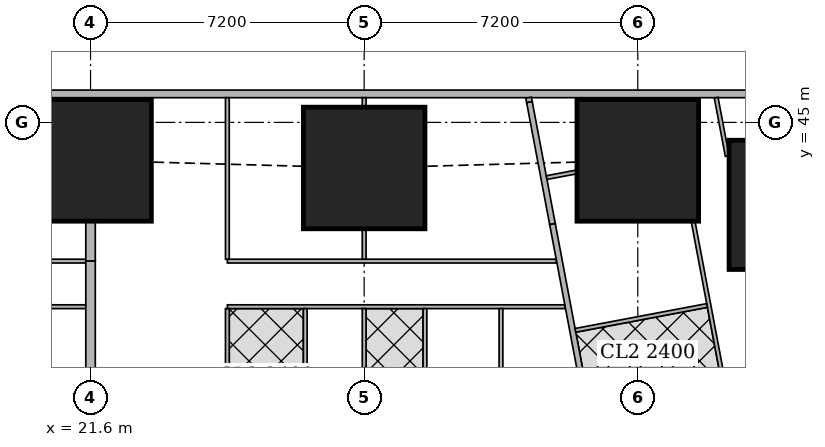
"""IFC4 building model, lengths in metres.
Left out: names, types, materials, properties, quantities, classifications, styles, units other than length and angle.
Written with IfcOpenShell. Run it as: python <this file> out.ifc"""

import sys

from ifc_helpers import new_model, si_unit, direction, frame, frame_2d, origin, origin_2d, place, context, subcontext, project, spatial, rectangle, extrude, element, fill, save


model = new_model("IFC4")
c1 = context("Model", 3, precision=1e-05, world=origin(), true_north=direction((0.0, 1.0)))
c2 = subcontext(c1, "Body", "Model", "MODEL_VIEW")
j1 = project(units=[si_unit("LENGTHUNIT", "METRE"), si_unit("PLANEANGLEUNIT", "RADIAN")], contexts=[c1])
p1 = place(None, origin())
s1 = spatial("IfcSite", under=j1, at=p1, CompositionType="ELEMENT")
p2 = place(p1, origin())
s2 = spatial("IfcBuilding", under=s1, at=p2, CompositionType="ELEMENT")
p3 = place(p2, frame((0.0, 0.0, 20.0)))
s3 = spatial("IfcBuildingStorey", under=s2, at=p3, CompositionType="ELEMENT", Elevation=20.0)
p4 = place(p3, frame((40.102, 42.83, 0.0), z_axis=(0.0, 0.0, 1.0), x_axis=(1.0, 0.0, 0.0)))
e1 = element("IfcColumn", 1, at=p4, inside=s3, PredefinedType="COLUMN", context=c2, shape_type="SweptSolid", body=[
    extrude(rectangle(XDim=3.4, YDim=3.4, at=origin_2d()), origin(), (0.0, 0.0, 1.0), 3.75),
])
p5 = place(p3, frame((21.6, 44.0, -0.3), z_axis=(0.0, 0.0, 1.0), x_axis=(1.0, 0.0, 0.0)))
e2 = element("IfcColumn", 2, at=p5, inside=s3, PredefinedType="COLUMN", context=c2, shape_type="SweptSolid", body=[
    extrude(rectangle(XDim=3.2, YDim=3.2, at=origin_2d()), origin(), (0.0, 0.0, 1.0), 4.05),
])
p6 = place(p3, frame((28.8, 43.8, 0.0), z_axis=(0.0, 0.0, 1.0), x_axis=(1.0, 0.0, 0.0)))
e3 = element("IfcColumn", 3, at=p6, inside=s3, PredefinedType="COLUMN", context=c2, shape_type="SweptSolid", body=[
    extrude(rectangle(XDim=3.2, YDim=3.2, at=origin_2d()), origin(), (0.0, 0.0, 1.0), 3.75),
])
p7 = place(p3, frame((36.0, 44.0, -0.3), z_axis=(0.0, 0.0, 1.0), x_axis=(1.0, 0.0, 0.0)))
e4 = element("IfcColumn", 4, at=p7, inside=s3, PredefinedType="COLUMN", context=c2, shape_type="SweptSolid", body=[
    extrude(rectangle(XDim=3.2, YDim=3.2, at=origin_2d()), origin(), (0.0, 0.0, 1.0), 4.05),
])
p8 = place(p3, frame((40.106, 45.75, 0.0), z_axis=(0.0, 0.0, 1.0), x_axis=(-1.0, 0.0, 0.0)))
e5 = element("IfcWall", 5, at=p8, inside=s3, PredefinedType="SOLIDWALL", context=c2, shape_type="SweptSolid", body=[
    extrude(rectangle(XDim=37.943, YDim=0.2, at=frame_2d((18.971, 0.0))), origin(), (0.0, 0.0, 1.0), 3.5),
])
p9 = place(p8, frame((8.606, 0.0, 0.9)))
e6 = element("IfcOpeningElement", 6, at=p9, cuts=e5, PredefinedType="OPENING", context=c2, shape_type="SweptSolid", body=[
    extrude(rectangle(XDim=1.8, YDim=1.5, at=frame_2d((0.9, 0.75))), frame((0.0, 0.11, 0.0), z_axis=(0.0, -1.0, 0.0), x_axis=(1.0, 0.0, 0.0)), (0.0, 0.0, 1.0), 0.22),
])
p10 = place(p8, frame((12.206, 0.0, 0.9)))
e7 = element("IfcOpeningElement", 7, at=p10, cuts=e5, PredefinedType="OPENING", context=c2, shape_type="SweptSolid", body=[
    extrude(rectangle(XDim=1.8, YDim=1.5, at=frame_2d((0.9, 0.75))), frame((0.0, 0.11, 0.0), z_axis=(0.0, -1.0, 0.0), x_axis=(1.0, 0.0, 0.0)), (0.0, 0.0, 1.0), 0.22),
])
p11 = place(p8, frame((15.806, 0.0, 0.9)))
e8 = element("IfcOpeningElement", 8, at=p11, cuts=e5, PredefinedType="OPENING", context=c2, shape_type="SweptSolid", body=[
    extrude(rectangle(XDim=1.8, YDim=1.5, at=frame_2d((0.9, 0.75))), frame((0.0, 0.11, 0.0), z_axis=(0.0, -1.0, 0.0), x_axis=(1.0, 0.0, 0.0)), (0.0, 0.0, 1.0), 0.22),
])
p12 = place(p8, frame((19.406, 0.0, 0.9)))
e9 = element("IfcOpeningElement", 9, at=p12, cuts=e5, PredefinedType="OPENING", context=c2, shape_type="SweptSolid", body=[
    extrude(rectangle(XDim=1.8, YDim=1.5, at=frame_2d((0.9, 0.75))), frame((0.0, 0.11, 0.0), z_axis=(0.0, -1.0, 0.0), x_axis=(1.0, 0.0, 0.0)), (0.0, 0.0, 1.0), 0.22),
])
p13 = place(p8, frame((23.006, 0.0, 0.9)))
e10 = element("IfcOpeningElement", 10, at=p13, cuts=e5, PredefinedType="OPENING", context=c2, shape_type="SweptSolid", body=[
    extrude(rectangle(XDim=1.8, YDim=1.5, at=frame_2d((0.9, 0.75))), frame((0.0, 0.11, 0.0), z_axis=(0.0, -1.0, 0.0), x_axis=(1.0, 0.0, 0.0)), (0.0, 0.0, 1.0), 0.22),
])
p14 = place(p8, frame((26.606, 0.0, 0.9)))
e11 = element("IfcOpeningElement", 11, at=p14, cuts=e5, PredefinedType="OPENING", context=c2, shape_type="SweptSolid", body=[
    extrude(rectangle(XDim=1.8, YDim=1.5, at=frame_2d((0.9, 0.75))), frame((0.0, 0.11, 0.0), z_axis=(0.0, -1.0, 0.0), x_axis=(1.0, 0.0, 0.0)), (0.0, 0.0, 1.0), 0.22),
])
p15 = place(p3, frame((33.127, 45.65, 0.0), z_axis=(0.0, 0.0, 1.0), x_axis=(0.184660164975, -0.98280243359, 0.0)))
e12 = element("IfcWall", 12, at=p15, inside=s3, PredefinedType="SOLIDWALL", context=c2, shape_type="SweptSolid", body=[
    extrude(rectangle(XDim=0.119, YDim=0.15, at=frame_2d((0.06, 0.0))), origin(), (0.0, 0.0, 1.0), 3.5),
])
p16 = place(p3, frame((33.149, 45.533, 0.0), z_axis=(0.0, 0.0, 1.0), x_axis=(0.185606774758, -0.98262410166, 0.0)))
e13 = element("IfcWall", 13, at=p16, inside=s3, PredefinedType="SOLIDWALL", context=c2, shape_type="SweptSolid", body=[
    extrude(rectangle(XDim=3.265, YDim=0.15, at=frame_2d((1.632, 0.0))), origin(), (0.0, 0.0, 1.0), 2.05),
])
p17 = place(p3, frame((33.755, 42.325, 0.0), z_axis=(0.0, 0.0, 1.0), x_axis=(0.185611461091, -0.982623216453, 0.0)))
e14 = element("IfcWall", 14, at=p17, inside=s3, PredefinedType="SOLIDWALL", context=c2, shape_type="SweptSolid", body=[
    extrude(rectangle(XDim=40.241, YDim=0.15, at=frame_2d((20.121, 0.0))), origin(), (0.0, 0.0, 1.0), 2.5),
])
p18 = place(p17, frame((7.325, 0.0, 0.0)))
e15 = element("IfcOpeningElement", 15, at=p18, cuts=e14, PredefinedType="OPENING", context=c2, shape_type="SweptSolid", body=[
    extrude(rectangle(XDim=1.0, YDim=2.1, at=frame_2d((0.5, 1.05))), frame((0.0, 0.085, 0.0), z_axis=(0.0, -1.0, 0.0), x_axis=(1.0, 0.0, 0.0)), (0.0, 0.0, 1.0), 0.17),
])
p19 = place(p17, frame((11.902, 0.0, 0.0)))
e16 = element("IfcOpeningElement", 16, at=p19, cuts=e14, PredefinedType="OPENING", context=c2, shape_type="SweptSolid", body=[
    extrude(rectangle(XDim=1.0, YDim=2.1, at=frame_2d((0.5, 1.05))), frame((0.0, 0.085, 0.0), z_axis=(0.0, -1.0, 0.0), x_axis=(1.0, 0.0, 0.0)), (0.0, 0.0, 1.0), 0.17),
])
p20 = place(p17, frame((25.718, 0.0, 0.0)))
e17 = element("IfcOpeningElement", 17, at=p20, cuts=e14, PredefinedType="OPENING", context=c2, shape_type="SweptSolid", body=[
    extrude(rectangle(XDim=1.0, YDim=2.1, at=frame_2d((0.5, 1.05))), frame((0.0, 0.085, 0.0), z_axis=(0.0, -1.0, 0.0), x_axis=(1.0, 0.0, 0.0)), (0.0, 0.0, 1.0), 0.17),
])
p21 = place(p17, frame((31.788, 0.0, 0.0)))
e18 = element("IfcOpeningElement", 18, at=p21, cuts=e14, PredefinedType="OPENING", context=c2, shape_type="SweptSolid", body=[
    extrude(rectangle(XDim=1.0, YDim=2.1, at=frame_2d((0.5, 1.05))), frame((0.0, 0.085, 0.0), z_axis=(0.0, -1.0, 0.0), x_axis=(1.0, 0.0, 0.0)), (0.0, 0.0, 1.0), 0.17),
])
p22 = place(p3, frame((38.063, 45.65, 0.0), z_axis=(0.0, 0.0, 1.0), x_axis=(0.185789650565, -0.982589540827, 0.0)))
e19 = element("IfcWall", 19, at=p22, inside=s3, PredefinedType="PARTITIONING", context=c2, shape_type="SweptSolid", body=[
    extrude(rectangle(XDim=1.561, YDim=0.1, at=frame_2d((0.781, 0.0))), origin(), (0.0, 0.0, 1.0), 3.5),
])
p23 = place(p3, frame((37.457, 42.39, 0.0), z_axis=(0.0, 0.0, 1.0), x_axis=(0.185560627322, -0.982632817276, 0.0)))
e20 = element("IfcWall", 20, at=p23, inside=s3, PredefinedType="PARTITIONING", context=c2, shape_type="SweptSolid", body=[
    extrude(rectangle(XDim=4.484, YDim=0.1, at=frame_2d((2.242, 0.0))), origin(), (0.0, 0.0, 1.0), 3.5),
])
p24 = place(p23, frame((2.936, 0.0, 0.0)))
e21 = element("IfcOpeningElement", 21, at=p24, cuts=e20, PredefinedType="OPENING", context=c2, shape_type="SweptSolid", body=[
    extrude(rectangle(XDim=0.9, YDim=2.1, at=frame_2d((0.45, 1.05))), frame((0.0, 0.06, 0.0), z_axis=(0.0, -1.0, 0.0), x_axis=(1.0, 0.0, 0.0)), (0.0, 0.0, 1.0), 0.12),
])
p25 = place(p3, frame((34.39, 43.696, 0.0), z_axis=(0.0, 0.0, 1.0), x_axis=(-0.982640737979, -0.185518678479, 0.0)))
e22 = element("IfcWall", 22, at=p25, inside=s3, PredefinedType="PARTITIONING", context=c2, shape_type="SweptSolid", body=[
    extrude(rectangle(XDim=0.803, YDim=0.1, at=frame_2d((0.401, 0.0))), origin(), (0.0, 0.0, 1.0), 2.05),
])
p26 = place(p3, frame((37.823, 40.182, 0.0), z_axis=(0.0, 0.0, 1.0), x_axis=(-0.98263926043, -0.185526504472, 0.0)))
e23 = element("IfcWall", 23, at=p26, inside=s3, PredefinedType="PARTITIONING", context=c2, shape_type="SweptSolid", body=[
    extrude(rectangle(XDim=3.524, YDim=0.1, at=frame_2d((1.762, 0.0))), origin(), (0.0, 0.0, 1.0), 3.5),
])
p27 = place(p3, frame((18.0, 41.35, 0.0), z_axis=(0.0, 0.0, 1.0), x_axis=(1.0, 0.0, 0.0)))
e24 = element("IfcWall", 24, at=p27, inside=s3, PredefinedType="PARTITIONING", context=c2, shape_type="SweptSolid", body=[
    extrude(rectangle(XDim=3.475, YDim=0.1, at=frame_2d((1.738, 0.0))), origin(), (0.0, 0.0, 1.0), 3.5),
])
p28 = place(p27, frame((0.2, 0.0, 0.0)))
e25 = element("IfcOpeningElement", 25, at=p28, cuts=e24, PredefinedType="OPENING", context=c2, shape_type="SweptSolid", body=[
    extrude(rectangle(XDim=0.9, YDim=2.1, at=frame_2d((0.45, 1.05))), frame((0.0, 0.06, 0.0), z_axis=(0.0, -1.0, 0.0), x_axis=(1.0, 0.0, 0.0)), (0.0, 0.0, 1.0), 0.12),
])
p29 = place(p3, frame((18.0, 40.15, 0.0), z_axis=(0.0, 0.0, 1.0), x_axis=(1.0, 0.0, 0.0)))
e26 = element("IfcWall", 26, at=p29, inside=s3, PredefinedType="PARTITIONING", context=c2, shape_type="SweptSolid", body=[
    extrude(rectangle(XDim=3.475, YDim=0.1, at=frame_2d((1.738, 0.0))), origin(), (0.0, 0.0, 1.0), 3.5),
])
p30 = place(p29, frame((0.575, 0.0, 0.0)))
e27 = element("IfcOpeningElement", 27, at=p30, cuts=e26, PredefinedType="OPENING", context=c2, shape_type="SweptSolid", body=[
    extrude(rectangle(XDim=0.9, YDim=2.1, at=frame_2d((0.45, 1.05))), frame((0.0, 0.06, 0.0), z_axis=(0.0, -1.0, 0.0), x_axis=(1.0, 0.0, 0.0)), (0.0, 0.0, 1.0), 0.12),
])
p31 = place(p29, frame((2.375, 0.0, 0.0)))
e28 = element("IfcOpeningElement", 28, at=p31, cuts=e26, PredefinedType="OPENING", context=c2, shape_type="SweptSolid", body=[
    extrude(rectangle(XDim=0.9, YDim=2.1, at=frame_2d((0.45, 1.05))), frame((0.0, 0.06, 0.0), z_axis=(0.0, -1.0, 0.0), x_axis=(1.0, 0.0, 0.0)), (0.0, 0.0, 1.0), 0.12),
])
p32 = place(p3, frame((25.2, 41.35, 0.0), z_axis=(0.0, 0.0, 1.0), x_axis=(1.0, 0.0, 0.0)))
e29 = element("IfcWall", 29, at=p32, inside=s3, PredefinedType="PARTITIONING", context=c2, shape_type="SweptSolid", body=[
    extrude(rectangle(XDim=8.653, YDim=0.1, at=frame_2d((4.327, 0.0))), origin(), (0.0, 0.0, 1.0), 3.5),
])
p33 = place(p32, frame((0.2, 0.0, 0.0)))
e30 = element("IfcOpeningElement", 30, at=p33, cuts=e29, PredefinedType="OPENING", context=c2, shape_type="SweptSolid", body=[
    extrude(rectangle(XDim=0.9, YDim=2.1, at=frame_2d((0.45, 1.05))), frame((0.0, 0.06, 0.0), z_axis=(0.0, -1.0, 0.0), x_axis=(1.0, 0.0, 0.0)), (0.0, 0.0, 1.0), 0.12),
])
p34 = place(p32, frame((5.25, 0.0, 0.0)))
e31 = element("IfcOpeningElement", 31, at=p34, cuts=e29, PredefinedType="OPENING", context=c2, shape_type="SweptSolid", body=[
    extrude(rectangle(XDim=0.9, YDim=2.1, at=frame_2d((0.45, 1.05))), frame((0.0, 0.06, 0.0), z_axis=(0.0, -1.0, 0.0), x_axis=(1.0, 0.0, 0.0)), (0.0, 0.0, 1.0), 0.12),
])
p35 = place(p3, frame((25.2, 40.15, 0.0), z_axis=(0.0, 0.0, 1.0), x_axis=(1.0, 0.0, 0.0)))
e32 = element("IfcWall", 32, at=p35, inside=s3, PredefinedType="PARTITIONING", context=c2, shape_type="SweptSolid", body=[
    extrude(rectangle(XDim=8.88, YDim=0.1, at=frame_2d((4.44, 0.0))), origin(), (0.0, 0.0, 1.0), 3.5),
])
p36 = place(p35, frame((0.575, 0.0, 0.0)))
e33 = element("IfcOpeningElement", 33, at=p36, cuts=e32, PredefinedType="OPENING", context=c2, shape_type="SweptSolid", body=[
    extrude(rectangle(XDim=0.9, YDim=2.1, at=frame_2d((0.45, 1.05))), frame((0.0, 0.06, 0.0), z_axis=(0.0, -1.0, 0.0), x_axis=(1.0, 0.0, 0.0)), (0.0, 0.0, 1.0), 0.12),
])
p37 = place(p35, frame((3.95, 0.0, 0.0)))
e34 = element("IfcOpeningElement", 34, at=p37, cuts=e32, PredefinedType="OPENING", context=c2, shape_type="SweptSolid", body=[
    extrude(rectangle(XDim=0.9, YDim=2.1, at=frame_2d((0.45, 1.05))), frame((0.0, 0.06, 0.0), z_axis=(0.0, -1.0, 0.0), x_axis=(1.0, 0.0, 0.0)), (0.0, 0.0, 1.0), 0.12),
])
p38 = place(p35, frame((7.83, 0.0, 0.0)))
e35 = element("IfcOpeningElement", 35, at=p38, cuts=e32, PredefinedType="OPENING", context=c2, shape_type="SweptSolid", body=[
    extrude(rectangle(XDim=0.9, YDim=2.1, at=frame_2d((0.45, 1.05))), frame((0.0, 0.06, 0.0), z_axis=(0.0, -1.0, 0.0), x_axis=(1.0, 0.0, 0.0)), (0.0, 0.0, 1.0), 0.12),
])
p39 = place(p35, frame((2.375, 0.0, 0.0)))
e36 = element("IfcOpeningElement", 36, at=p39, cuts=e32, PredefinedType="OPENING", context=c2, shape_type="SweptSolid", body=[
    extrude(rectangle(XDim=0.9, YDim=2.1, at=frame_2d((0.45, 1.05))), frame((0.0, 0.06, 0.0), z_axis=(0.0, -1.0, 0.0), x_axis=(1.0, 0.0, 0.0)), (0.0, 0.0, 1.0), 0.12),
])
p40 = place(p35, frame((5.75, 0.0, 0.0)))
e37 = element("IfcOpeningElement", 37, at=p40, cuts=e32, PredefinedType="OPENING", context=c2, shape_type="SweptSolid", body=[
    extrude(rectangle(XDim=0.9, YDim=2.1, at=frame_2d((0.45, 1.05))), frame((0.0, 0.06, 0.0), z_axis=(0.0, -1.0, 0.0), x_axis=(1.0, 0.0, 0.0)), (0.0, 0.0, 1.0), 0.12),
])
p41 = place(p3, frame((25.2, 41.4, 0.0), z_axis=(0.0, 0.0, 1.0), x_axis=(0.0, 1.0, 0.0)))
e38 = element("IfcWall", 38, at=p41, inside=s3, PredefinedType="PARTITIONING", context=c2, shape_type="SweptSolid", body=[
    extrude(rectangle(XDim=4.25, YDim=0.1, at=frame_2d((2.125, 0.0))), origin(), (0.0, 0.0, 1.0), 2.05),
])
p42 = place(p3, frame((28.8, 41.4, 0.0), z_axis=(0.0, 0.0, 1.0), x_axis=(0.0, 1.0, 0.0)))
e39 = element("IfcWall", 39, at=p42, inside=s3, PredefinedType="PARTITIONING", context=c2, shape_type="SweptSolid", body=[
    extrude(rectangle(XDim=0.799, YDim=0.1, at=frame_2d((0.399, 0.0))), origin(), (0.0, 0.0, 1.0), 3.5),
])
p43 = place(p3, frame((28.8, 45.401, 0.0), z_axis=(0.0, 0.0, 1.0), x_axis=(0.0, 1.0, 0.0)))
e40 = element("IfcWall", 40, at=p43, inside=s3, PredefinedType="PARTITIONING", context=c2, shape_type="SweptSolid", body=[
    extrude(rectangle(XDim=0.249, YDim=0.1, at=frame_2d((0.125, 0.0))), origin(), (0.0, 0.0, 1.0), 3.5),
])
p44 = place(p3, frame((25.2, 36.575, 0.0), z_axis=(0.0, 0.0, 1.0), x_axis=(0.0, 1.0, 0.0)))
e41 = element("IfcWall", 41, at=p44, inside=s3, PredefinedType="PARTITIONING", context=c2, shape_type="SweptSolid", body=[
    extrude(rectangle(XDim=3.525, YDim=0.1, at=frame_2d((1.763, 0.0))), origin(), (0.0, 0.0, 1.0), 3.5),
])
p45 = place(p3, frame((28.8, 38.401, 0.0), z_axis=(0.0, 0.0, 1.0), x_axis=(0.0, 1.0, 0.0)))
e42 = element("IfcWall", 42, at=p45, inside=s3, PredefinedType="PARTITIONING", context=c2, shape_type="SweptSolid", body=[
    extrude(rectangle(XDim=1.699, YDim=0.1, at=frame_2d((0.85, 0.0))), origin(), (0.0, 0.0, 1.0), 3.5),
])
for number, where, z_axis, x_axis in (
    (43, (32.4, 36.575, 0.0), (0.0, 0.0, 1.0), (0.0, 1.0, 0.0)),
    (44, (27.25, 36.575, 0.0), (0.0, 0.0, 1.0), (0.0, 1.0, 0.0)),
    (45, (30.4, 36.575, 0.0), (0.0, 0.0, 1.0), (0.0, 1.0, 0.0)),
):
    element("IfcWall", number, at=place(p3, frame(where, z_axis=z_axis, x_axis=x_axis)), inside=s3, PredefinedType="PARTITIONING", context=c2, shape_type="SweptSolid", body=[
        extrude(rectangle(XDim=3.525, YDim=0.1, at=frame_2d((1.763, 0.0))), origin(), (0.0, 0.0, 1.0), 3.5),
    ])
p46 = place(p3, frame((21.6, 41.35, 0.0), z_axis=(0.0, 0.0, 1.0), x_axis=(0.0, 1.0, 0.0)))
e46 = element("IfcWall", 46, at=p46, inside=s3, PredefinedType="SOLIDWALL", context=c2, shape_type="SweptSolid", body=[
    extrude(rectangle(XDim=1.049, YDim=0.25, at=frame_2d((0.524, 0.0))), origin(), (0.0, 0.0, 1.0), 2.05),
])
p47 = place(p3, frame((21.6, 38.401, 0.0), z_axis=(0.0, 0.0, 1.0), x_axis=(0.0, 1.0, 0.0)))
e47 = element("IfcWall", 47, at=p47, inside=s3, PredefinedType="SOLIDWALL", context=c2, shape_type="SweptSolid", body=[
    extrude(rectangle(XDim=2.949, YDim=0.25, at=frame_2d((1.475, 0.0))), origin(), (0.0, 0.0, 1.0), 3.5),
])
p48 = place(p9, origin())
e48 = element("IfcWindow", 48, at=p48, inside=s3, PartitioningType="SINGLE_PANEL", PredefinedType="WINDOW", context=c2, shape_type="SweptSolid", body=[
    extrude(rectangle(XDim=1.8, YDim=1.5, at=frame_2d((0.9, 0.75))), frame((0.0, 0.03, 0.0), z_axis=(0.0, -1.0, 0.0), x_axis=(1.0, 0.0, 0.0)), (0.0, 0.0, 1.0), 0.06),
])
fill(e6, e48)
p49 = place(p10, origin())
e49 = element("IfcWindow", 49, at=p49, inside=s3, PartitioningType="SINGLE_PANEL", PredefinedType="WINDOW", context=c2, shape_type="SweptSolid", body=[
    extrude(rectangle(XDim=1.8, YDim=1.5, at=frame_2d((0.9, 0.75))), frame((0.0, 0.03, 0.0), z_axis=(0.0, -1.0, 0.0), x_axis=(1.0, 0.0, 0.0)), (0.0, 0.0, 1.0), 0.06),
])
fill(e7, e49)
p50 = place(p11, origin())
e50 = element("IfcWindow", 50, at=p50, inside=s3, PartitioningType="SINGLE_PANEL", PredefinedType="WINDOW", context=c2, shape_type="SweptSolid", body=[
    extrude(rectangle(XDim=1.8, YDim=1.5, at=frame_2d((0.9, 0.75))), frame((0.0, 0.03, 0.0), z_axis=(0.0, -1.0, 0.0), x_axis=(1.0, 0.0, 0.0)), (0.0, 0.0, 1.0), 0.06),
])
fill(e8, e50)
p51 = place(p12, origin())
e51 = element("IfcWindow", 51, at=p51, inside=s3, PartitioningType="SINGLE_PANEL", PredefinedType="WINDOW", context=c2, shape_type="SweptSolid", body=[
    extrude(rectangle(XDim=1.8, YDim=1.5, at=frame_2d((0.9, 0.75))), frame((0.0, 0.03, 0.0), z_axis=(0.0, -1.0, 0.0), x_axis=(1.0, 0.0, 0.0)), (0.0, 0.0, 1.0), 0.06),
])
fill(e9, e51)
p52 = place(p24, origin())
e52 = element("IfcDoor", 52, at=p52, inside=s3, OperationType="SINGLE_SWING_LEFT", PredefinedType="DOOR", context=c2, shape_type="SweptSolid", body=[
    extrude(rectangle(XDim=0.9, YDim=2.1, at=frame_2d((0.45, 1.05))), frame((0.0, 0.025, 0.0), z_axis=(0.0, -1.0, 0.0), x_axis=(1.0, 0.0, 0.0)), (0.0, 0.0, 1.0), 0.05),
])
fill(e21, e52)
p53 = place(p31, origin())
e53 = element("IfcDoor", 53, at=p53, inside=s3, OperationType="SINGLE_SWING_LEFT", PredefinedType="DOOR", context=c2, shape_type="SweptSolid", body=[
    extrude(rectangle(XDim=0.9, YDim=2.1, at=frame_2d((0.45, 1.05))), frame((0.0, 0.025, 0.0), z_axis=(0.0, -1.0, 0.0), x_axis=(1.0, 0.0, 0.0)), (0.0, 0.0, 1.0), 0.05),
])
fill(e28, e53)
p54 = place(p33, origin())
e54 = element("IfcDoor", 54, at=p54, inside=s3, OperationType="SINGLE_SWING_LEFT", PredefinedType="DOOR", context=c2, shape_type="SweptSolid", body=[
    extrude(rectangle(XDim=0.9, YDim=2.1, at=frame_2d((0.45, 1.05))), frame((0.0, 0.025, 0.0), z_axis=(0.0, -1.0, 0.0), x_axis=(1.0, 0.0, 0.0)), (0.0, 0.0, 1.0), 0.05),
])
fill(e30, e54)
p55 = place(p34, origin())
e55 = element("IfcDoor", 55, at=p55, inside=s3, OperationType="SINGLE_SWING_LEFT", PredefinedType="DOOR", context=c2, shape_type="SweptSolid", body=[
    extrude(rectangle(XDim=0.9, YDim=2.1, at=frame_2d((0.45, 1.05))), frame((0.0, 0.025, 0.0), z_axis=(0.0, -1.0, 0.0), x_axis=(1.0, 0.0, 0.0)), (0.0, 0.0, 1.0), 0.05),
])
fill(e31, e55)
p56 = place(p36, origin())
e56 = element("IfcDoor", 56, at=p56, inside=s3, OperationType="SINGLE_SWING_RIGHT", PredefinedType="DOOR", context=c2, shape_type="SweptSolid", body=[
    extrude(rectangle(XDim=0.9, YDim=2.1, at=frame_2d((0.45, 1.05))), frame((0.0, 0.025, 0.0), z_axis=(0.0, -1.0, 0.0), x_axis=(1.0, 0.0, 0.0)), (0.0, 0.0, 1.0), 0.05),
])
fill(e33, e56)
p57 = place(p37, origin())
e57 = element("IfcDoor", 57, at=p57, inside=s3, OperationType="SINGLE_SWING_LEFT", PredefinedType="DOOR", context=c2, shape_type="SweptSolid", body=[
    extrude(rectangle(XDim=0.9, YDim=2.1, at=frame_2d((0.45, 1.05))), frame((0.0, 0.025, 0.0), z_axis=(0.0, -1.0, 0.0), x_axis=(1.0, 0.0, 0.0)), (0.0, 0.0, 1.0), 0.05),
])
fill(e34, e57)
p58 = place(p38, origin())
e58 = element("IfcDoor", 58, at=p58, inside=s3, OperationType="SINGLE_SWING_LEFT", PredefinedType="DOOR", context=c2, shape_type="SweptSolid", body=[
    extrude(rectangle(XDim=0.9, YDim=2.1, at=frame_2d((0.45, 1.05))), frame((0.0, 0.025, 0.0), z_axis=(0.0, -1.0, 0.0), x_axis=(1.0, 0.0, 0.0)), (0.0, 0.0, 1.0), 0.05),
])
fill(e35, e58)
p59 = place(p39, origin())
e59 = element("IfcDoor", 59, at=p59, inside=s3, OperationType="SINGLE_SWING_RIGHT", PredefinedType="DOOR", context=c2, shape_type="SweptSolid", body=[
    extrude(rectangle(XDim=0.9, YDim=2.1, at=frame_2d((0.45, 1.05))), frame((0.0, 0.025, 0.0), z_axis=(0.0, -1.0, 0.0), x_axis=(1.0, 0.0, 0.0)), (0.0, 0.0, 1.0), 0.05),
])
fill(e36, e59)
p60 = place(p40, origin())
e60 = element("IfcDoor", 60, at=p60, inside=s3, OperationType="SINGLE_SWING_RIGHT", PredefinedType="DOOR", context=c2, shape_type="SweptSolid", body=[
    extrude(rectangle(XDim=0.9, YDim=2.1, at=frame_2d((0.45, 1.05))), frame((0.0, 0.025, 0.0), z_axis=(0.0, -1.0, 0.0), x_axis=(1.0, 0.0, 0.0)), (0.0, 0.0, 1.0), 0.05),
])
fill(e37, e60)
save(model, sys.argv[1])
